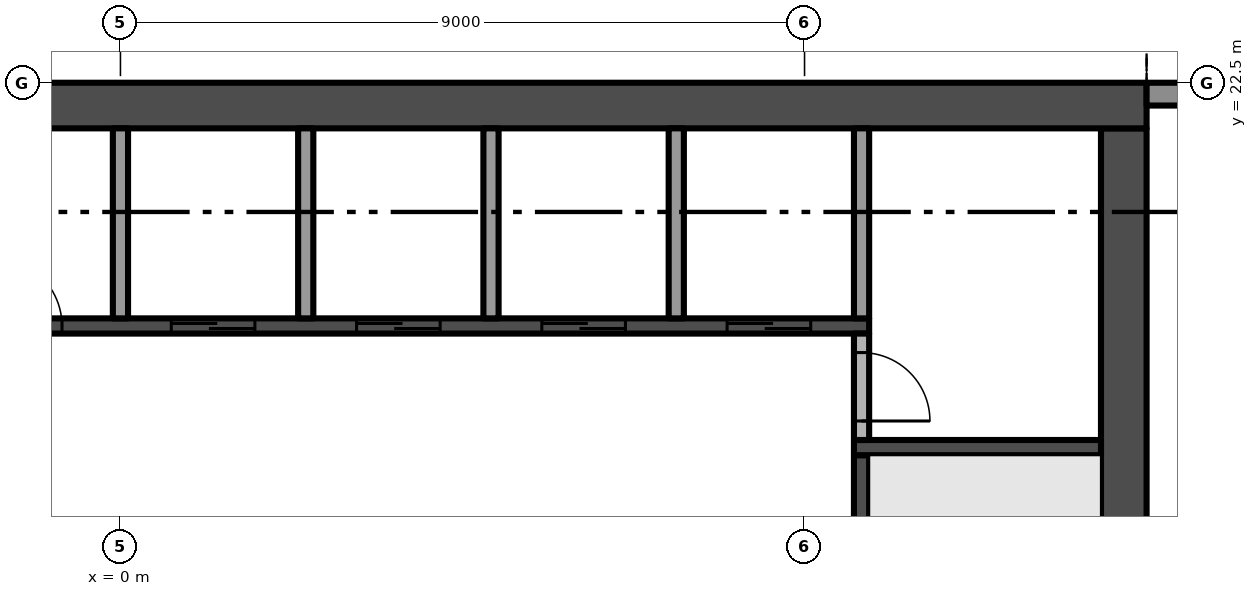
"""IFC4 building model, lengths in metres.
Left out: names, types, materials, properties, quantities, classifications, styles, units other than length and angle.
Written with IfcOpenShell. Run it as: python <this file> out.ifc"""

import sys

from ifc_helpers import new_model, si_unit, direction, frame, frame_2d, origin, place, context, subcontext, project, spatial, polyline, rectangle, outline, extrude, element, fill, save


model = new_model("IFC4")
c1 = context("Model", 3, precision=1e-05, world=origin(), true_north=direction((0.0, 1.0)))
c2 = subcontext(c1, "Body", "Model", "MODEL_VIEW")
j1 = project(units=[si_unit("LENGTHUNIT", "METRE"), si_unit("PLANEANGLEUNIT", "RADIAN")], contexts=[c1])
p1 = place(None, origin())
s1 = spatial("IfcSite", under=j1, at=p1, CompositionType="ELEMENT")
p2 = place(p1, origin())
s2 = spatial("IfcBuilding", under=s1, at=p2, CompositionType="ELEMENT")
p3 = place(p2, frame((0.0, 0.0, 226.2)))
s3 = spatial("IfcBuildingStorey", under=s2, at=p3, CompositionType="ELEMENT", Elevation=226.2)
p4 = place(p3, frame((13.2, 5.1, -0.3), z_axis=(0.0, 0.0, 1.0), x_axis=(0.0, 1.0, 0.0)))
e1 = element("IfcWall", 1, at=p4, inside=s3, PredefinedType="SHEAR", context=c2, shape_type="SweptSolid", body=[
    extrude(rectangle(XDim=16.8, YDim=0.6, at=frame_2d((8.4, 0.0))), origin(), (0.0, 0.0, 1.0), 3.8),
])
p5 = place(p4, frame((6.3, 0.0, 0.3)))
e2 = element("IfcOpeningElement", 2, at=p5, cuts=e1, PredefinedType="OPENING", context=c2, shape_type="SweptSolid", body=[
    extrude(rectangle(XDim=1.2, YDim=2.2, at=frame_2d((0.6, 1.1))), frame((0.0, 0.31, 0.0), z_axis=(0.0, -1.0, 0.0), x_axis=(1.0, 0.0, 0.0)), (0.0, 0.0, 1.0), 0.62),
])
p6 = place(p3, frame((13.5, 22.2, -0.3), z_axis=(0.0, 0.0, 1.0), x_axis=(-1.0, 0.0, 0.0)))
e3 = element("IfcWall", 3, at=p6, inside=s3, PredefinedType="SHEAR", context=c2, shape_type="SweptSolid", body=[
    extrude(rectangle(XDim=27.0, YDim=0.6, at=frame_2d((13.5, 0.0))), origin(), (0.0, 0.0, 1.0), 3.8),
])
p7 = place(p3, frame((13.5, 22.35, 0.0), z_axis=(0.0, 0.0, 1.0), x_axis=(1.0, 0.0, 0.0)))
e4 = element("IfcWall", 4, at=p7, inside=s3, PredefinedType="SOLIDWALL", context=c2, shape_type="SweptSolid", body=[
    extrude(rectangle(XDim=4.025, YDim=0.3, at=frame_2d((2.013, 0.0))), origin(), (0.0, 0.0, 1.0), 3.5),
])
p8 = place(p7, frame((0.625, 0.0, 0.0)))
e5 = element("IfcOpeningElement", 5, at=p8, cuts=e4, PredefinedType="OPENING", context=c2, shape_type="SweptSolid", body=[
    extrude(rectangle(XDim=2.4, YDim=2.4, at=frame_2d((1.2, 1.2))), frame((0.0, 0.16, 0.0), z_axis=(0.0, -1.0, 0.0), x_axis=(1.0, 0.0, 0.0)), (0.0, 0.0, 1.0), 0.32),
])
p9 = place(p3, origin())
e6 = element("IfcWall", 6, at=p9, inside=s3, PredefinedType="USERDEFINED", context=c2, shape_type="SweptSolid", body=[
    extrude(outline(polyline([(22.5, 24.3), (21.0, 23.595), (19.5, 23.159), (18.75, 23.1), (18.0, 23.159), (16.5, 23.595), (15.0, 24.3), (13.5, 25.005), (13.394, 24.779), (14.894, 24.074), (16.411, 23.36), (17.955, 22.911), (18.75, 22.849), (19.545, 22.911), (21.089, 23.36), (22.606, 24.074), (22.5, 24.3)])), origin(), (0.0, 0.0, 1.0), 0.9),
])
p10 = place(p3, frame((-9.85, 19.3, 0.0), z_axis=(0.0, 0.0, 1.0), x_axis=(1.0, 0.0, 0.0)))
e7 = element("IfcWall", 7, at=p10, inside=s3, PredefinedType="SHEAR", context=c2, shape_type="SweptSolid", body=[
    extrude(rectangle(XDim=19.7, YDim=0.2, at=frame_2d((9.85, 0.0))), origin(), (0.0, 0.0, 1.0), 3.5),
])
p11 = place(p10, frame((10.519, 0.0, 0.0)))
e8 = element("IfcOpeningElement", 8, at=p11, cuts=e7, PredefinedType="OPENING", context=c2, shape_type="SweptSolid", body=[
    extrude(rectangle(XDim=1.1, YDim=2.1, at=frame_2d((0.55, 1.05))), frame((0.0, 0.11, 0.0), z_axis=(0.0, -1.0, 0.0), x_axis=(1.0, 0.0, 0.0)), (0.0, 0.0, 1.0), 0.22),
])
p12 = place(p10, frame((12.956, 0.0, 0.0)))
e9 = element("IfcOpeningElement", 9, at=p12, cuts=e7, PredefinedType="OPENING", context=c2, shape_type="SweptSolid", body=[
    extrude(rectangle(XDim=1.1, YDim=2.1, at=frame_2d((0.55, 1.05))), frame((0.0, 0.11, 0.0), z_axis=(0.0, -1.0, 0.0), x_axis=(1.0, 0.0, 0.0)), (0.0, 0.0, 1.0), 0.22),
])
p13 = place(p10, frame((15.394, 0.0, 0.0)))
e10 = element("IfcOpeningElement", 10, at=p13, cuts=e7, PredefinedType="OPENING", context=c2, shape_type="SweptSolid", body=[
    extrude(rectangle(XDim=1.1, YDim=2.1, at=frame_2d((0.55, 1.05))), frame((0.0, 0.11, 0.0), z_axis=(0.0, -1.0, 0.0), x_axis=(1.0, 0.0, 0.0)), (0.0, 0.0, 1.0), 0.22),
])
p14 = place(p10, frame((17.831, 0.0, 0.0)))
e11 = element("IfcOpeningElement", 11, at=p14, cuts=e7, PredefinedType="OPENING", context=c2, shape_type="SweptSolid", body=[
    extrude(rectangle(XDim=1.1, YDim=2.1, at=frame_2d((0.55, 1.05))), frame((0.0, 0.11, 0.0), z_axis=(0.0, -1.0, 0.0), x_axis=(1.0, 0.0, 0.0)), (0.0, 0.0, 1.0), 0.22),
])
p15 = place(p10, frame((0.869, 0.0, 0.0)))
e12 = element("IfcOpeningElement", 12, at=p15, cuts=e7, PredefinedType="OPENING", context=c2, shape_type="SweptSolid", body=[
    extrude(rectangle(XDim=0.9, YDim=2.1, at=frame_2d((0.45, 1.05))), frame((0.0, 0.11, 0.0), z_axis=(0.0, -1.0, 0.0), x_axis=(1.0, 0.0, 0.0)), (0.0, 0.0, 1.0), 0.22),
])
p16 = place(p10, frame((4.525, 0.0, 0.0)))
e13 = element("IfcOpeningElement", 13, at=p16, cuts=e7, PredefinedType="OPENING", context=c2, shape_type="SweptSolid", body=[
    extrude(rectangle(XDim=0.9, YDim=2.1, at=frame_2d((0.45, 1.05))), frame((0.0, 0.11, 0.0), z_axis=(0.0, -1.0, 0.0), x_axis=(1.0, 0.0, 0.0)), (0.0, 0.0, 1.0), 0.22),
])
p17 = place(p10, frame((8.181, 0.0, 0.0)))
e14 = element("IfcOpeningElement", 14, at=p17, cuts=e7, PredefinedType="OPENING", context=c2, shape_type="SweptSolid", body=[
    extrude(rectangle(XDim=0.9, YDim=2.1, at=frame_2d((0.45, 1.05))), frame((0.0, 0.11, 0.0), z_axis=(0.0, -1.0, 0.0), x_axis=(1.0, 0.0, 0.0)), (0.0, 0.0, 1.0), 0.22),
])
for number, where, z_axis, x_axis in (
    (15, (0.0, 19.4, 0.0), (0.0, 0.0, 1.0), (0.0, 1.0, 0.0)),
    (16, (2.438, 19.4, 0.0), (0.0, 0.0, 1.0), (0.0, 1.0, 0.0)),
    (17, (4.875, 19.4, 0.0), (0.0, 0.0, 1.0), (0.0, 1.0, 0.0)),
    (18, (7.312, 19.4, 0.0), (0.0, 0.0, 1.0), (0.0, 1.0, 0.0)),
):
    element("IfcWall", number, at=place(p3, frame(where, z_axis=z_axis, x_axis=x_axis)), inside=s3, PredefinedType="PARTITIONING", context=c2, shape_type="SweptSolid", body=[
        extrude(rectangle(XDim=2.5, YDim=0.2, at=frame_2d((1.25, 0.0))), origin(), (0.0, 0.0, 1.0), 3.5),
    ])
p18 = place(p3, frame((9.75, 16.1, 0.0), z_axis=(0.0, 0.0, 1.0), x_axis=(0.0, 1.0, 0.0)))
e19 = element("IfcWall", 19, at=p18, inside=s3, PredefinedType="SHEAR", context=c2, shape_type="SweptSolid", body=[
    extrude(rectangle(XDim=1.5, YDim=0.2, at=frame_2d((0.75, 0.0))), origin(), (0.0, 0.0, 1.0), 3.5),
])
p19 = place(p3, frame((9.65, 17.7, 0.0), z_axis=(0.0, 0.0, 1.0), x_axis=(1.0, 0.0, 0.0)))
e20 = element("IfcWall", 20, at=p19, inside=s3, PredefinedType="SHEAR", context=c2, shape_type="SweptSolid", body=[
    extrude(rectangle(XDim=3.25, YDim=0.2, at=frame_2d((1.625, 0.0))), origin(), (0.0, 0.0, 1.0), 3.5),
])
p20 = place(p3, frame((9.75, 19.2, 0.0), z_axis=(0.0, 0.0, 1.0), x_axis=(0.0, -1.0, 0.0)))
e21 = element("IfcWall", 21, at=p20, inside=s3, PredefinedType="PARTITIONING", context=c2, shape_type="SweptSolid", body=[
    extrude(rectangle(XDim=1.4, YDim=0.2, at=frame_2d((0.7, 0.0))), origin(), (0.0, 0.0, 1.0), 3.5),
])
p21 = place(p20, frame((0.25, 0.0, 0.0)))
e22 = element("IfcOpeningElement", 22, at=p21, cuts=e21, PredefinedType="OPENING", context=c2, shape_type="SweptSolid", body=[
    extrude(rectangle(XDim=0.9, YDim=2.1, at=frame_2d((0.45, 1.05))), frame((0.0, 0.11, 0.0), z_axis=(0.0, -1.0, 0.0), x_axis=(1.0, 0.0, 0.0)), (0.0, 0.0, 1.0), 0.22),
])
p22 = place(p3, frame((9.75, 19.4, 0.0), z_axis=(0.0, 0.0, 1.0), x_axis=(0.0, 1.0, 0.0)))
e23 = element("IfcWall", 23, at=p22, inside=s3, PredefinedType="PARTITIONING", context=c2, shape_type="SweptSolid", body=[
    extrude(rectangle(XDim=2.5, YDim=0.2, at=frame_2d((1.25, 0.0))), origin(), (0.0, 0.0, 1.0), 3.5),
])
p23 = place(p11, origin())
e24 = element("IfcDoor", 24, at=p23, inside=s3, OperationType="SLIDING_TO_RIGHT", PredefinedType="DOOR", context=c2, shape_type="SweptSolid", body=[
    extrude(rectangle(XDim=1.1, YDim=2.1, at=frame_2d((0.55, 1.05))), frame((0.0, 0.025, 0.0), z_axis=(0.0, -1.0, 0.0), x_axis=(1.0, 0.0, 0.0)), (0.0, 0.0, 1.0), 0.05),
])
fill(e8, e24)
p24 = place(p12, origin())
e25 = element("IfcDoor", 25, at=p24, inside=s3, OperationType="SLIDING_TO_RIGHT", PredefinedType="DOOR", context=c2, shape_type="SweptSolid", body=[
    extrude(rectangle(XDim=1.1, YDim=2.1, at=frame_2d((0.55, 1.05))), frame((0.0, 0.025, 0.0), z_axis=(0.0, -1.0, 0.0), x_axis=(1.0, 0.0, 0.0)), (0.0, 0.0, 1.0), 0.05),
])
fill(e9, e25)
p25 = place(p13, origin())
e26 = element("IfcDoor", 26, at=p25, inside=s3, OperationType="SLIDING_TO_RIGHT", PredefinedType="DOOR", context=c2, shape_type="SweptSolid", body=[
    extrude(rectangle(XDim=1.1, YDim=2.1, at=frame_2d((0.55, 1.05))), frame((0.0, 0.025, 0.0), z_axis=(0.0, -1.0, 0.0), x_axis=(1.0, 0.0, 0.0)), (0.0, 0.0, 1.0), 0.05),
])
fill(e10, e26)
p26 = place(p14, origin())
e27 = element("IfcDoor", 27, at=p26, inside=s3, OperationType="SLIDING_TO_RIGHT", PredefinedType="DOOR", context=c2, shape_type="SweptSolid", body=[
    extrude(rectangle(XDim=1.1, YDim=2.1, at=frame_2d((0.55, 1.05))), frame((0.0, 0.025, 0.0), z_axis=(0.0, -1.0, 0.0), x_axis=(1.0, 0.0, 0.0)), (0.0, 0.0, 1.0), 0.05),
])
fill(e11, e27)
p27 = place(p21, origin())
e28 = element("IfcDoor", 28, at=p27, inside=s3, OperationType="SINGLE_SWING_RIGHT", PredefinedType="DOOR", context=c2, shape_type="SweptSolid", body=[
    extrude(rectangle(XDim=0.9, YDim=2.1, at=frame_2d((0.45, 1.05))), frame((0.0, 0.025, 0.0), z_axis=(0.0, -1.0, 0.0), x_axis=(1.0, 0.0, 0.0)), (0.0, 0.0, 1.0), 0.05),
])
fill(e22, e28)
p28 = place(p17, origin())
e29 = element("IfcDoor", 29, at=p28, inside=s3, OperationType="SINGLE_SWING_LEFT", PredefinedType="DOOR", context=c2, shape_type="SweptSolid", body=[
    extrude(rectangle(XDim=0.9, YDim=2.1, at=frame_2d((0.45, 1.05))), frame((0.0, 0.025, 0.0), z_axis=(0.0, -1.0, 0.0), x_axis=(1.0, 0.0, 0.0)), (0.0, 0.0, 1.0), 0.05),
])
fill(e14, e29)
save(model, sys.argv[1])
